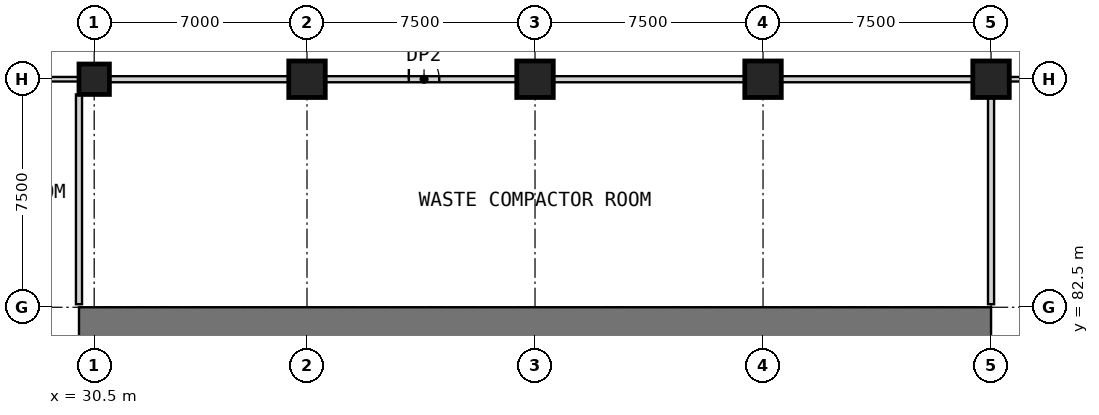
"""IFC4 building model, lengths in metres.
Left out: names, types, materials, properties, quantities, classifications, styles, units other than length and angle.
Written with IfcOpenShell. Run it as: python <this file> out.ifc"""

import sys

from ifc_helpers import new_model, si_unit, direction, frame, frame_2d, origin, origin_2d, place, context, subcontext, project, spatial, rectangle, extrude, element, fill, save


model = new_model("IFC4")
c1 = context("Model", 3, precision=1e-05, world=origin(), true_north=direction((0.0, 1.0)))
c2 = subcontext(c1, "Body", "Model", "MODEL_VIEW")
j1 = project(units=[si_unit("LENGTHUNIT", "METRE"), si_unit("PLANEANGLEUNIT", "RADIAN")], contexts=[c1])
p1 = place(None, origin())
s1 = spatial("IfcSite", under=j1, at=p1, CompositionType="ELEMENT")
p2 = place(p1, origin())
s2 = spatial("IfcBuilding", under=s1, at=p2, CompositionType="ELEMENT")
p3 = place(p2, frame((0.0, 0.0, -6.0)))
s3 = spatial("IfcBuildingStorey", under=s2, at=p3, CompositionType="ELEMENT", Elevation=-6.0)
p4 = place(p3, frame((30.5, 90.0, 0.0), z_axis=(0.0, 0.0, 1.0), x_axis=(1.0, 0.0, 0.0)))
e1 = element("IfcColumn", 1, at=p4, inside=s3, PredefinedType="COLUMN", context=c2, shape_type="SweptSolid", body=[
    extrude(rectangle(XDim=1.0, YDim=1.0, at=origin_2d()), origin(), (0.0, 0.0, 1.0), 6.0),
])
for number, where, z_axis, x_axis in (
    (2, (37.5, 90.0, 0.0), (0.0, 0.0, 1.0), (1.0, 0.0, 0.0)),
    (3, (45.0, 90.0, 0.0), (0.0, 0.0, 1.0), (1.0, 0.0, 0.0)),
    (4, (52.5, 90.0, 0.0), (0.0, 0.0, 1.0), (1.0, 0.0, 0.0)),
    (5, (60.0, 90.0, 0.0), (0.0, 0.0, 1.0), (1.0, 0.0, 0.0)),
):
    element("IfcColumn", number, at=place(p3, frame(where, z_axis=z_axis, x_axis=x_axis)), inside=s3, PredefinedType="COLUMN", context=c2, shape_type="SweptSolid", body=[
        extrude(rectangle(XDim=1.2, YDim=1.2, at=origin_2d()), origin(), (0.0, 0.0, 1.0), 6.0),
    ])
p5 = place(p3, frame((30.0, 82.0, 0.0), z_axis=(0.0, 0.0, 1.0), x_axis=(1.0, 0.0, 0.0)))
e6 = element("IfcWall", 6, at=p5, inside=s3, PredefinedType="SHEAR", context=c2, shape_type="SweptSolid", body=[
    extrude(rectangle(XDim=30.0, YDim=1.0, at=frame_2d((15.0, 0.0))), origin(), (0.0, 0.0, 1.0), 6.0),
])
p6 = place(p3, frame((23.6, 90.0, 0.0), z_axis=(0.0, 0.0, 1.0), x_axis=(1.0, 0.0, 0.0)))
e7 = element("IfcWall", 7, at=p6, inside=s3, PredefinedType="PARTITIONING", context=c2, shape_type="SweptSolid", body=[
    extrude(rectangle(XDim=6.4, YDim=0.15, at=frame_2d((3.2, 0.0))), origin(), (0.0, 0.0, 1.0), 5.7),
])
p7 = place(p6, frame((2.5, 0.0, 0.0)))
e8 = element("IfcOpeningElement", 8, at=p7, cuts=e7, PredefinedType="OPENING", context=c2, shape_type="SweptSolid", body=[
    extrude(rectangle(XDim=1.0, YDim=2.1, at=frame_2d((0.5, 1.05))), frame((0.0, 0.085, 0.0), z_axis=(0.0, -1.0, 0.0), x_axis=(1.0, 0.0, 0.0)), (0.0, 0.0, 1.0), 0.17),
])
p8 = place(p3, frame((31.0, 90.0, 0.0), z_axis=(0.0, 0.0, 1.0), x_axis=(1.0, 0.0, 0.0)))
e9 = element("IfcWall", 9, at=p8, inside=s3, PredefinedType="PARTITIONING", context=c2, shape_type="SweptSolid", body=[
    extrude(rectangle(XDim=5.9, YDim=0.2, at=frame_2d((2.95, 0.0))), origin(), (0.0, 0.0, 1.0), 5.7),
])
p9 = place(p3, frame((38.1, 90.0, 0.0), z_axis=(0.0, 0.0, 1.0), x_axis=(1.0, 0.0, 0.0)))
e10 = element("IfcWall", 10, at=p9, inside=s3, PredefinedType="PARTITIONING", context=c2, shape_type="SweptSolid", body=[
    extrude(rectangle(XDim=6.3, YDim=0.2, at=frame_2d((3.15, 0.0))), origin(), (0.0, 0.0, 1.0), 5.7),
])
p10 = place(p9, frame((2.75, 0.0, 0.0)))
e11 = element("IfcOpeningElement", 11, at=p10, cuts=e10, PredefinedType="OPENING", context=c2, shape_type="SweptSolid", body=[
    extrude(rectangle(XDim=1.0, YDim=2.1, at=frame_2d((0.5, 1.05))), frame((0.0, 0.11, 0.0), z_axis=(0.0, -1.0, 0.0), x_axis=(1.0, 0.0, 0.0)), (0.0, 0.0, 1.0), 0.22),
])
for number, where, z_axis, x_axis in (
    (12, (45.6, 90.0, 0.0), (0.0, 0.0, 1.0), (1.0, 0.0, 0.0)),
    (13, (53.1, 90.0, 0.0), (0.0, 0.0, 1.0), (1.0, 0.0, 0.0)),
):
    element("IfcWall", number, at=place(p3, frame(where, z_axis=z_axis, x_axis=x_axis)), inside=s3, PredefinedType="PARTITIONING", context=c2, shape_type="SweptSolid", body=[
        extrude(rectangle(XDim=6.3, YDim=0.2, at=frame_2d((3.15, 0.0))), origin(), (0.0, 0.0, 1.0), 5.7),
    ])
p11 = place(p3, frame((60.6, 90.0, 0.0), z_axis=(0.0, 0.0, 1.0), x_axis=(1.0, 0.0, 0.0)))
e14 = element("IfcWall", 14, at=p11, inside=s3, PredefinedType="PARTITIONING", context=c2, shape_type="SweptSolid", body=[
    extrude(rectangle(XDim=6.3, YDim=0.15, at=frame_2d((3.15, 0.0))), origin(), (0.0, 0.0, 1.0), 5.7),
])
p12 = place(p3, frame((30.0, 82.6, 0.0), z_axis=(0.0, 0.0, 1.0), x_axis=(0.0, 1.0, 0.0)))
e15 = element("IfcWall", 15, at=p12, inside=s3, PredefinedType="PARTITIONING", context=c2, shape_type="SweptSolid", body=[
    extrude(rectangle(XDim=6.9, YDim=0.2, at=frame_2d((3.45, 0.0))), origin(), (0.0, 0.0, 1.0), 5.7),
])
p13 = place(p3, frame((60.0, 82.6, 0.0), z_axis=(0.0, 0.0, 1.0), x_axis=(0.0, 1.0, 0.0)))
e16 = element("IfcWall", 16, at=p13, inside=s3, PredefinedType="PARTITIONING", context=c2, shape_type="SweptSolid", body=[
    extrude(rectangle(XDim=6.8, YDim=0.2, at=frame_2d((3.4, 0.0))), origin(), (0.0, 0.0, 1.0), 5.7),
])
p14 = place(p10, origin())
e17 = element("IfcDoor", 17, at=p14, inside=s3, OperationType="SINGLE_SWING_LEFT", PredefinedType="DOOR", context=c2, shape_type="SweptSolid", body=[
    extrude(rectangle(XDim=1.0, YDim=2.1, at=frame_2d((0.5, 1.05))), frame((0.0, 0.025, 0.0), z_axis=(0.0, -1.0, 0.0), x_axis=(1.0, 0.0, 0.0)), (0.0, 0.0, 1.0), 0.05),
])
fill(e11, e17)
save(model, sys.argv[1])
